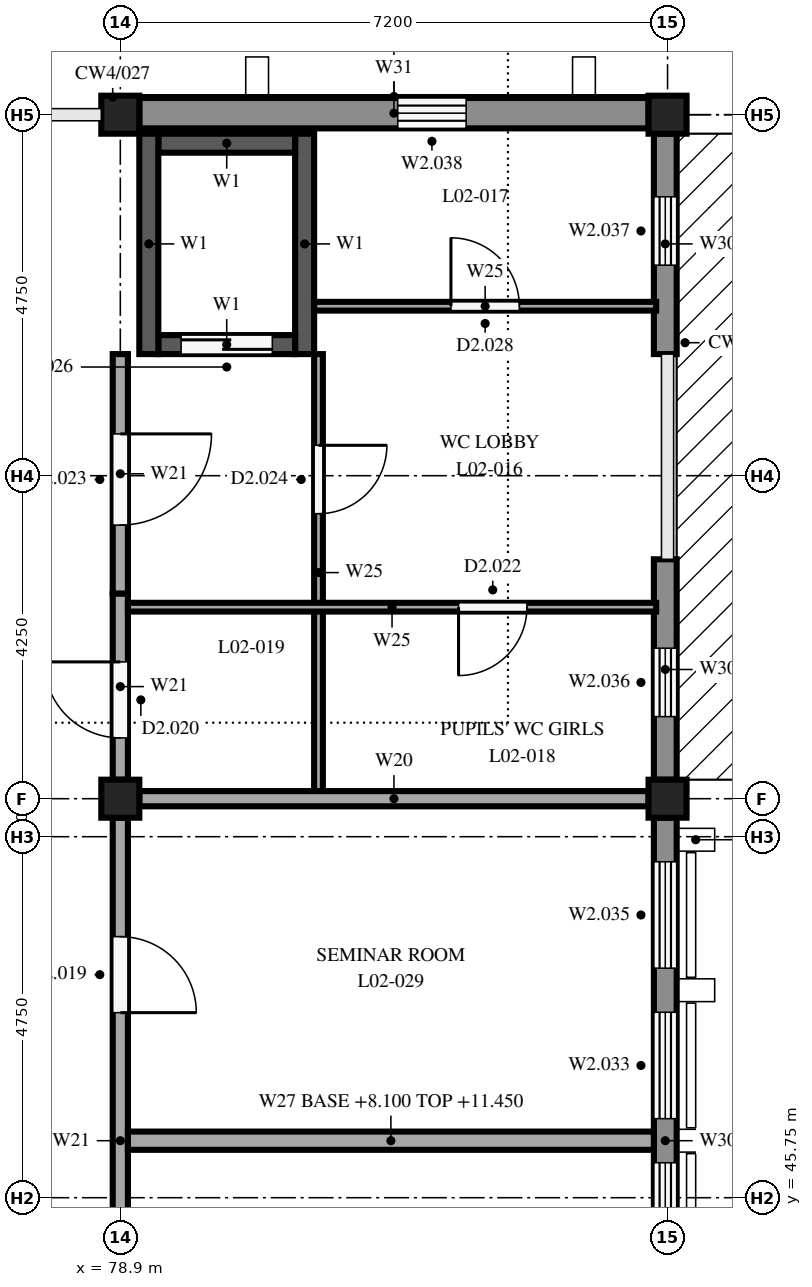
"""IFC4 building model, lengths in metres.
Left out: names, types, materials, properties, quantities, classifications, styles, units other than length and angle.
Written with IfcOpenShell. Run it as: python <this file> out.ifc"""

import sys

from ifc_helpers import new_model, si_unit, direction, frame, frame_2d, origin, origin_2d, place, context, subcontext, project, spatial, rectangle, extrude, element, fill, save


model = new_model("IFC4")
c1 = context("Model", 3, precision=1e-05, world=origin(), true_north=direction((0.0, 1.0)))
c2 = subcontext(c1, "Body", "Model", "MODEL_VIEW")
j1 = project(units=[si_unit("LENGTHUNIT", "METRE"), si_unit("PLANEANGLEUNIT", "RADIAN")], contexts=[c1])
p1 = place(None, origin())
s1 = spatial("IfcSite", under=j1, at=p1, CompositionType="ELEMENT")
p2 = place(p1, origin())
s2 = spatial("IfcBuilding", under=s1, at=p2, CompositionType="ELEMENT")
p3 = place(p2, frame((0.0, 0.0, 8.1)))
s3 = spatial("IfcBuildingStorey", under=s2, at=p3, CompositionType="ELEMENT", Elevation=8.1)
for number, where, z_axis, x_axis in (
    (1, (78.9, 51.0, 0.0), (0.0, 0.0, 1.0), (1.0, 0.0, 0.0)),
    (2, (78.9, 60.0, 0.0), (0.0, 0.0, 1.0), (1.0, 0.0, 0.0)),
    (3, (86.1, 51.0, 0.0), (0.0, 0.0, 1.0), (1.0, 0.0, 0.0)),
    (4, (86.1, 60.0, 0.0), (0.0, 0.0, 1.0), (1.0, 0.0, 0.0)),
):
    element("IfcColumn", number, at=place(p3, frame(where, z_axis=z_axis, x_axis=x_axis)), inside=s3, PredefinedType="COLUMN", context=c2, shape_type="SweptSolid", body=[
        extrude(rectangle(XDim=0.5, YDim=0.5, at=origin_2d()), origin(), (0.0, 0.0, 1.0), 3.35),
    ])
for number, where, z_axis, x_axis in (
    (5, (79.275, 56.85, 0.0), (0.0, 0.0, 1.0), (0.0, 1.0, 0.0)),
    (6, (81.325, 56.85, 0.0), (0.0, 0.0, 1.0), (0.0, 1.0, 0.0)),
):
    element("IfcWall", number, at=place(p3, frame(where, z_axis=z_axis, x_axis=x_axis)), inside=s3, PredefinedType="SHEAR", context=c2, shape_type="SweptSolid", body=[
        extrude(rectangle(XDim=2.9, YDim=0.25, at=frame_2d((1.45, 0.0))), origin(), (0.0, 0.0, 1.0), 3.35),
    ])
p4 = place(p3, frame((79.4, 56.975, 0.0), z_axis=(0.0, 0.0, 1.0), x_axis=(1.0, 0.0, 0.0)))
e7 = element("IfcWall", 7, at=p4, inside=s3, PredefinedType="SHEAR", context=c2, shape_type="SweptSolid", body=[
    extrude(rectangle(XDim=1.8, YDim=0.25, at=frame_2d((0.9, 0.0))), origin(), (0.0, 0.0, 1.0), 3.35),
])
p5 = place(p4, frame((0.3, 0.0, 0.0)))
e8 = element("IfcOpeningElement", 8, at=p5, cuts=e7, PredefinedType="OPENING", context=c2, shape_type="SweptSolid", body=[
    extrude(rectangle(XDim=1.2, YDim=2.1, at=frame_2d((0.6, 1.05))), frame((0.0, 0.135, 0.0), z_axis=(0.0, -1.0, 0.0), x_axis=(1.0, 0.0, 0.0)), (0.0, 0.0, 1.0), 0.27),
])
p6 = place(p3, frame((79.4, 59.625, 0.0), z_axis=(0.0, 0.0, 1.0), x_axis=(1.0, 0.0, 0.0)))
e9 = element("IfcWall", 9, at=p6, inside=s3, PredefinedType="SHEAR", context=c2, shape_type="SweptSolid", body=[
    extrude(rectangle(XDim=1.8, YDim=0.25, at=frame_2d((0.9, 0.0))), origin(), (0.0, 0.0, 1.0), 3.35),
])
p7 = place(p3, frame((86.07, 50.75, 0.0), z_axis=(0.0, 0.0, 1.0), x_axis=(0.0, -1.0, 0.0)))
e10 = element("IfcWall", 10, at=p7, inside=s3, PredefinedType="STANDARD", context=c2, shape_type="SweptSolid", body=[
    extrude(rectangle(XDim=8.5, YDim=0.3, at=frame_2d((4.25, 0.0))), origin(), (0.0, 0.0, 1.0), 2.85),
])
p8 = place(p7, frame((6.52, 0.0, 0.9)))
e11 = element("IfcOpeningElement", 11, at=p8, cuts=e10, PredefinedType="OPENING", context=c2, shape_type="SweptSolid", body=[
    extrude(rectangle(XDim=1.4, YDim=1.9, at=frame_2d((0.7, 0.95))), frame((0.0, 0.16, 0.0), z_axis=(0.0, -1.0, 0.0), x_axis=(1.0, 0.0, 0.0)), (0.0, 0.0, 1.0), 0.32),
])
p9 = place(p7, frame((4.54, 0.0, 0.9)))
e12 = element("IfcOpeningElement", 12, at=p9, cuts=e10, PredefinedType="OPENING", context=c2, shape_type="SweptSolid", body=[
    extrude(rectangle(XDim=1.4, YDim=1.9, at=frame_2d((0.7, 0.95))), frame((0.0, 0.16, 0.0), z_axis=(0.0, -1.0, 0.0), x_axis=(1.0, 0.0, 0.0)), (0.0, 0.0, 1.0), 0.32),
])
p10 = place(p7, frame((2.56, 0.0, 0.6)))
e13 = element("IfcOpeningElement", 13, at=p10, cuts=e10, PredefinedType="OPENING", context=c2, shape_type="SweptSolid", body=[
    extrude(rectangle(XDim=1.4, YDim=2.2, at=frame_2d((0.7, 1.1))), frame((0.0, 0.16, 0.0), z_axis=(0.0, -1.0, 0.0), x_axis=(1.0, 0.0, 0.0)), (0.0, 0.0, 1.0), 0.32),
])
p11 = place(p7, frame((0.58, 0.0, 0.6)))
e14 = element("IfcOpeningElement", 14, at=p11, cuts=e10, PredefinedType="OPENING", context=c2, shape_type="SweptSolid", body=[
    extrude(rectangle(XDim=1.4, YDim=2.2, at=frame_2d((0.7, 1.1))), frame((0.0, 0.16, 0.0), z_axis=(0.0, -1.0, 0.0), x_axis=(1.0, 0.0, 0.0)), (0.0, 0.0, 1.0), 0.32),
])
p12 = place(p3, frame((86.07, 54.15, 0.0), z_axis=(0.0, 0.0, 1.0), x_axis=(0.0, -1.0, 0.0)))
e15 = element("IfcWall", 15, at=p12, inside=s3, PredefinedType="STANDARD", context=c2, shape_type="SweptSolid", body=[
    extrude(rectangle(XDim=2.9, YDim=0.3, at=frame_2d((1.45, 0.0))), origin(), (0.0, 0.0, 1.0), 2.85),
])
p13 = place(p12, frame((1.17, 0.0, 1.6)))
e16 = element("IfcOpeningElement", 16, at=p13, cuts=e15, PredefinedType="OPENING", context=c2, shape_type="SweptSolid", body=[
    extrude(rectangle(XDim=0.9, YDim=1.0, at=frame_2d((0.45, 0.5))), frame((0.0, 0.16, 0.0), z_axis=(0.0, -1.0, 0.0), x_axis=(1.0, 0.0, 0.0)), (0.0, 0.0, 1.0), 0.32),
])
p14 = place(p3, frame((86.07, 59.75, 0.0), z_axis=(0.0, 0.0, 1.0), x_axis=(0.0, -1.0, 0.0)))
e17 = element("IfcWall", 17, at=p14, inside=s3, PredefinedType="STANDARD", context=c2, shape_type="SweptSolid", body=[
    extrude(rectangle(XDim=2.9, YDim=0.3, at=frame_2d((1.45, 0.0))), origin(), (0.0, 0.0, 1.0), 2.85),
])
p15 = place(p14, frame((0.83, 0.0, 1.6)))
e18 = element("IfcOpeningElement", 18, at=p15, cuts=e17, PredefinedType="OPENING", context=c2, shape_type="SweptSolid", body=[
    extrude(rectangle(XDim=0.9, YDim=1.0, at=frame_2d((0.45, 0.5))), frame((0.0, 0.16, 0.0), z_axis=(0.0, -1.0, 0.0), x_axis=(1.0, 0.0, 0.0)), (0.0, 0.0, 1.0), 0.32),
])
p16 = place(p3, frame((79.15, 60.02, 0.0), z_axis=(0.0, 0.0, 1.0), x_axis=(1.0, 0.0, 0.0)))
e19 = element("IfcWall", 19, at=p16, inside=s3, PredefinedType="STANDARD", context=c2, shape_type="SweptSolid", body=[
    extrude(rectangle(XDim=6.7, YDim=0.4, at=frame_2d((3.35, 0.0))), origin(), (0.0, 0.0, 1.0), 2.9),
])
p17 = place(p16, frame((3.4, 0.0, 1.6)))
e20 = element("IfcOpeningElement", 20, at=p17, cuts=e19, PredefinedType="OPENING", context=c2, shape_type="SweptSolid", body=[
    extrude(rectangle(XDim=0.9, YDim=1.0, at=frame_2d((0.45, 0.5))), frame((0.0, 0.21, 0.0), z_axis=(0.0, -1.0, 0.0), x_axis=(1.0, 0.0, 0.0)), (0.0, 0.0, 1.0), 0.42),
])
p18 = place(p3, frame((78.9, 51.25, 0.0), z_axis=(0.0, 0.0, 1.0), x_axis=(0.0, 1.0, 0.0)))
e21 = element("IfcWall", 21, at=p18, inside=s3, PredefinedType="PARTITIONING", context=c2, shape_type="SweptSolid", body=[
    extrude(rectangle(XDim=2.45, YDim=0.2, at=frame_2d((1.225, 0.0))), origin(), (0.0, 0.0, 1.0), 2.9),
])
p19 = place(p18, frame((0.55, 0.0, 0.0)))
e22 = element("IfcOpeningElement", 22, at=p19, cuts=e21, PredefinedType="OPENING", context=c2, shape_type="SweptSolid", body=[
    extrude(rectangle(XDim=1.0, YDim=2.1, at=frame_2d((0.5, 1.05))), frame((0.0, 0.11, 0.0), z_axis=(0.0, -1.0, 0.0), x_axis=(1.0, 0.0, 0.0)), (0.0, 0.0, 1.0), 0.22),
])
p20 = place(p3, frame((78.9, 56.85, 0.0), z_axis=(0.0, 0.0, 1.0), x_axis=(0.0, -1.0, 0.0)))
e23 = element("IfcWall", 23, at=p20, inside=s3, PredefinedType="PARTITIONING", context=c2, shape_type="SweptSolid", body=[
    extrude(rectangle(XDim=3.15, YDim=0.2, at=frame_2d((1.575, 0.0))), origin(), (0.0, 0.0, 1.0), 2.9),
])
p21 = place(p20, frame((1.05, 0.0, 0.0)))
e24 = element("IfcOpeningElement", 24, at=p21, cuts=e23, PredefinedType="OPENING", context=c2, shape_type="SweptSolid", body=[
    extrude(rectangle(XDim=1.2, YDim=2.1, at=frame_2d((0.6, 1.05))), frame((0.0, 0.11, 0.0), z_axis=(0.0, -1.0, 0.0), x_axis=(1.0, 0.0, 0.0)), (0.0, 0.0, 1.0), 0.22),
])
p22 = place(p3, frame((79.15, 51.0, 0.0), z_axis=(0.0, 0.0, 1.0), x_axis=(1.0, 0.0, 0.0)))
e25 = element("IfcWall", 25, at=p22, inside=s3, PredefinedType="PARTITIONING", context=c2, shape_type="SweptSolid", body=[
    extrude(rectangle(XDim=6.7, YDim=0.2, at=frame_2d((3.35, 0.0))), origin(), (0.0, 0.0, 1.0), 2.9),
])
p23 = place(p3, frame((81.508, 56.85, 0.0), z_axis=(0.0, 0.0, 1.0), x_axis=(0.0, -1.0, 0.0)))
e26 = element("IfcWall", 26, at=p23, inside=s3, PredefinedType="PARTITIONING", context=c2, shape_type="SweptSolid", body=[
    extrude(rectangle(XDim=5.75, YDim=0.115, at=frame_2d((2.875, 0.0))), origin(), (0.0, 0.0, 1.0), 3.35),
])
p24 = place(p23, frame((1.2, 0.0, 0.0)))
e27 = element("IfcOpeningElement", 27, at=p24, cuts=e26, PredefinedType="OPENING", context=c2, shape_type="SweptSolid", body=[
    extrude(rectangle(XDim=0.9, YDim=2.1, at=frame_2d((0.45, 1.05))), frame((0.0, 0.067, 0.0), z_axis=(0.0, -1.0, 0.0), x_axis=(1.0, 0.0, 0.0)), (0.0, 0.0, 1.0), 0.135),
])
p25 = place(p3, frame((81.45, 57.48, 0.0), z_axis=(0.0, 0.0, 1.0), x_axis=(1.0, 0.0, 0.0)))
e28 = element("IfcWall", 28, at=p25, inside=s3, PredefinedType="PARTITIONING", context=c2, shape_type="SweptSolid", body=[
    extrude(rectangle(XDim=4.5, YDim=0.115, at=frame_2d((2.25, 0.0))), origin(), (0.0, 0.0, 1.0), 3.35),
])
p26 = place(p25, frame((1.8, 0.0, 0.0)))
e29 = element("IfcOpeningElement", 29, at=p26, cuts=e28, PredefinedType="OPENING", context=c2, shape_type="SweptSolid", body=[
    extrude(rectangle(XDim=0.9, YDim=2.1, at=frame_2d((0.45, 1.05))), frame((0.0, 0.067, 0.0), z_axis=(0.0, -1.0, 0.0), x_axis=(1.0, 0.0, 0.0)), (0.0, 0.0, 1.0), 0.135),
])
p27 = place(p3, frame((85.95, 53.52, 0.0), z_axis=(0.0, 0.0, 1.0), x_axis=(-1.0, 0.0, 0.0)))
e30 = element("IfcWall", 30, at=p27, inside=s3, PredefinedType="PARTITIONING", context=c2, shape_type="SweptSolid", body=[
    extrude(rectangle(XDim=6.95, YDim=0.115, at=frame_2d((3.475, 0.0))), origin(), (0.0, 0.0, 1.0), 3.35),
])
p28 = place(p27, frame((1.7, 0.0, 0.0)))
e31 = element("IfcOpeningElement", 31, at=p28, cuts=e30, PredefinedType="OPENING", context=c2, shape_type="SweptSolid", body=[
    extrude(rectangle(XDim=0.9, YDim=2.1, at=frame_2d((0.45, 1.05))), frame((0.0, 0.067, 0.0), z_axis=(0.0, -1.0, 0.0), x_axis=(1.0, 0.0, 0.0)), (0.0, 0.0, 1.0), 0.135),
])
p29 = place(p3, frame((78.9, 50.75, 0.0), z_axis=(0.0, 0.0, 1.0), x_axis=(0.0, -1.0, 0.0)))
e32 = element("IfcWall", 32, at=p29, inside=s3, PredefinedType="PARTITIONING", context=c2, shape_type="SweptSolid", body=[
    extrude(rectangle(XDim=8.5, YDim=0.2, at=frame_2d((4.25, 0.0))), origin(), (0.0, 0.0, 1.0), 2.9),
])
p30 = place(p29, frame((1.565, 0.0, 0.0)))
e33 = element("IfcOpeningElement", 33, at=p30, cuts=e32, PredefinedType="OPENING", context=c2, shape_type="SweptSolid", body=[
    extrude(rectangle(XDim=1.0, YDim=2.1, at=frame_2d((0.5, 1.05))), frame((0.0, 0.11, 0.0), z_axis=(0.0, -1.0, 0.0), x_axis=(1.0, 0.0, 0.0)), (0.0, 0.0, 1.0), 0.22),
])
p31 = place(p3, frame((79.0, 46.5, 0.0), z_axis=(0.0, 0.0, 1.0), x_axis=(1.0, 0.0, 0.0)))
e34 = element("IfcWall", 34, at=p31, inside=s3, PredefinedType="PARTITIONING", context=c2, shape_type="SweptSolid", body=[
    extrude(rectangle(XDim=6.92, YDim=0.24, at=frame_2d((3.46, 0.0))), origin(), (0.0, 0.0, 1.0), 3.35),
])
p32 = place(p9, origin())
e35 = element("IfcWindow", 35, at=p32, inside=s3, PartitioningType="DOUBLE_PANEL_VERTICAL", PredefinedType="WINDOW", context=c2, shape_type="SweptSolid", body=[
    extrude(rectangle(XDim=1.4, YDim=1.9, at=frame_2d((0.7, 0.95))), frame((0.0, 0.03, 0.0), z_axis=(0.0, -1.0, 0.0), x_axis=(1.0, 0.0, 0.0)), (0.0, 0.0, 1.0), 0.06),
])
fill(e12, e35)
p33 = place(p10, origin())
e36 = element("IfcWindow", 36, at=p33, inside=s3, PartitioningType="DOUBLE_PANEL_VERTICAL", PredefinedType="WINDOW", context=c2, shape_type="SweptSolid", body=[
    extrude(rectangle(XDim=1.4, YDim=2.2, at=frame_2d((0.7, 1.1))), frame((0.0, 0.03, 0.0), z_axis=(0.0, -1.0, 0.0), x_axis=(1.0, 0.0, 0.0)), (0.0, 0.0, 1.0), 0.06),
])
fill(e13, e36)
p34 = place(p11, origin())
e37 = element("IfcWindow", 37, at=p34, inside=s3, PartitioningType="DOUBLE_PANEL_VERTICAL", PredefinedType="WINDOW", context=c2, shape_type="SweptSolid", body=[
    extrude(rectangle(XDim=1.4, YDim=2.2, at=frame_2d((0.7, 1.1))), frame((0.0, 0.03, 0.0), z_axis=(0.0, -1.0, 0.0), x_axis=(1.0, 0.0, 0.0)), (0.0, 0.0, 1.0), 0.06),
])
fill(e14, e37)
p35 = place(p13, origin())
e38 = element("IfcWindow", 38, at=p35, inside=s3, PartitioningType="SINGLE_PANEL", PredefinedType="WINDOW", context=c2, shape_type="SweptSolid", body=[
    extrude(rectangle(XDim=0.9, YDim=1.0, at=frame_2d((0.45, 0.5))), frame((0.0, 0.03, 0.0), z_axis=(0.0, -1.0, 0.0), x_axis=(1.0, 0.0, 0.0)), (0.0, 0.0, 1.0), 0.06),
])
fill(e16, e38)
p36 = place(p15, origin())
e39 = element("IfcWindow", 39, at=p36, inside=s3, PartitioningType="SINGLE_PANEL", PredefinedType="WINDOW", context=c2, shape_type="SweptSolid", body=[
    extrude(rectangle(XDim=0.9, YDim=1.0, at=frame_2d((0.45, 0.5))), frame((0.0, 0.03, 0.0), z_axis=(0.0, -1.0, 0.0), x_axis=(1.0, 0.0, 0.0)), (0.0, 0.0, 1.0), 0.06),
])
fill(e18, e39)
p37 = place(p17, origin())
e40 = element("IfcWindow", 40, at=p37, inside=s3, PartitioningType="SINGLE_PANEL", PredefinedType="WINDOW", context=c2, shape_type="SweptSolid", body=[
    extrude(rectangle(XDim=0.9, YDim=1.0, at=frame_2d((0.45, 0.5))), frame((0.0, 0.03, 0.0), z_axis=(0.0, -1.0, 0.0), x_axis=(1.0, 0.0, 0.0)), (0.0, 0.0, 1.0), 0.06),
])
fill(e20, e40)
p38 = place(p19, origin())
e41 = element("IfcDoor", 41, at=p38, inside=s3, OperationType="SINGLE_SWING_RIGHT", PredefinedType="DOOR", context=c2, shape_type="SweptSolid", body=[
    extrude(rectangle(XDim=1.0, YDim=2.1, at=frame_2d((0.5, 1.05))), frame((0.0, 0.025, 0.0), z_axis=(0.0, -1.0, 0.0), x_axis=(1.0, 0.0, 0.0)), (0.0, 0.0, 1.0), 0.05),
])
fill(e22, e41)
p39 = place(p21, origin())
e42 = element("IfcDoor", 42, at=p39, inside=s3, OperationType="SINGLE_SWING_LEFT", PredefinedType="DOOR", context=c2, shape_type="SweptSolid", body=[
    extrude(rectangle(XDim=1.2, YDim=2.1, at=frame_2d((0.6, 1.05))), frame((0.0, 0.025, 0.0), z_axis=(0.0, -1.0, 0.0), x_axis=(1.0, 0.0, 0.0)), (0.0, 0.0, 1.0), 0.05),
])
fill(e24, e42)
p40 = place(p24, origin())
e43 = element("IfcDoor", 43, at=p40, inside=s3, OperationType="SINGLE_SWING_LEFT", PredefinedType="DOOR", context=c2, shape_type="SweptSolid", body=[
    extrude(rectangle(XDim=0.9, YDim=2.1, at=frame_2d((0.45, 1.05))), frame((0.0, 0.025, 0.0), z_axis=(0.0, -1.0, 0.0), x_axis=(1.0, 0.0, 0.0)), (0.0, 0.0, 1.0), 0.05),
])
fill(e27, e43)
p41 = place(p26, origin())
e44 = element("IfcDoor", 44, at=p41, inside=s3, OperationType="SINGLE_SWING_LEFT", PredefinedType="DOOR", context=c2, shape_type="SweptSolid", body=[
    extrude(rectangle(XDim=0.9, YDim=2.1, at=frame_2d((0.45, 1.05))), frame((0.0, 0.025, 0.0), z_axis=(0.0, -1.0, 0.0), x_axis=(1.0, 0.0, 0.0)), (0.0, 0.0, 1.0), 0.05),
])
fill(e29, e44)
p42 = place(p28, origin())
e45 = element("IfcDoor", 45, at=p42, inside=s3, OperationType="SINGLE_SWING_RIGHT", PredefinedType="DOOR", context=c2, shape_type="SweptSolid", body=[
    extrude(rectangle(XDim=0.9, YDim=2.1, at=frame_2d((0.45, 1.05))), frame((0.0, 0.025, 0.0), z_axis=(0.0, -1.0, 0.0), x_axis=(1.0, 0.0, 0.0)), (0.0, 0.0, 1.0), 0.05),
])
fill(e31, e45)
p43 = place(p30, origin())
e46 = element("IfcDoor", 46, at=p43, inside=s3, OperationType="SINGLE_SWING_RIGHT", PredefinedType="DOOR", context=c2, shape_type="SweptSolid", body=[
    extrude(rectangle(XDim=1.0, YDim=2.1, at=frame_2d((0.5, 1.05))), frame((0.0, 0.025, 0.0), z_axis=(0.0, -1.0, 0.0), x_axis=(1.0, 0.0, 0.0)), (0.0, 0.0, 1.0), 0.05),
])
fill(e33, e46)
p44 = place(p5, origin())
e47 = element("IfcDoor", 47, at=p44, inside=s3, OperationType="SLIDING_TO_LEFT", PredefinedType="DOOR", context=c2, shape_type="SweptSolid", body=[
    extrude(rectangle(XDim=1.2, YDim=2.1, at=frame_2d((0.6, 1.05))), frame((0.0, 0.025, 0.0), z_axis=(0.0, -1.0, 0.0), x_axis=(1.0, 0.0, 0.0)), (0.0, 0.0, 1.0), 0.05),
])
fill(e8, e47)
save(model, sys.argv[1])
